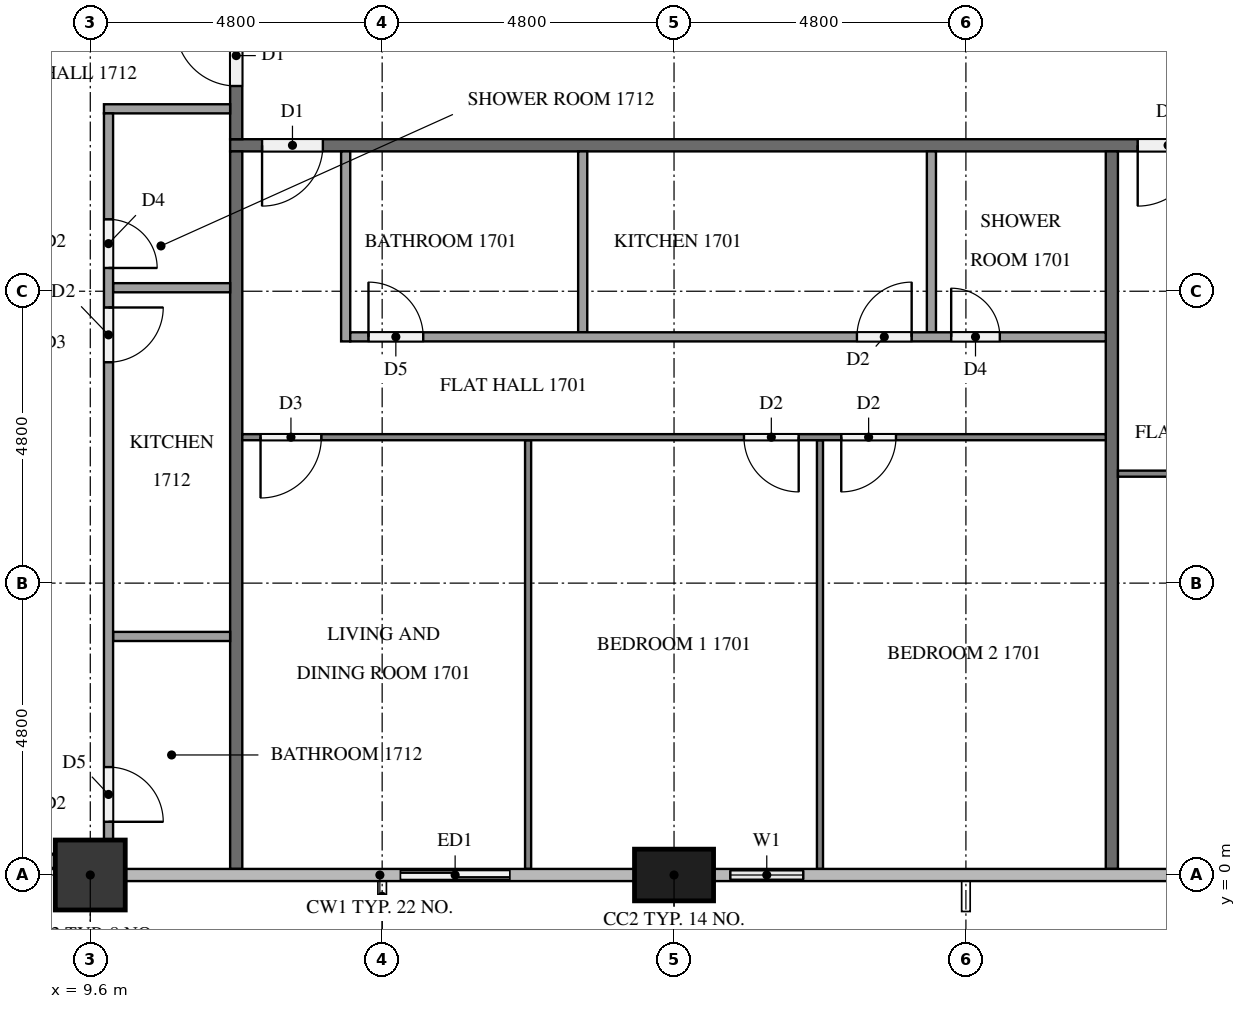
"""IFC4 building model, lengths in metres.
Left out: names, types, materials, properties, quantities, classifications, styles, units other than length and angle.
Written with IfcOpenShell. Run it as: python <this file> out.ifc"""

import sys

from ifc_helpers import new_model, si_unit, direction, frame, frame_2d, origin, origin_2d, place, context, subcontext, project, spatial, rectangle, extrude, element, fill, save


model = new_model("IFC4")
c1 = context("Model", 3, precision=1e-05, world=origin(), true_north=direction((0.0, 1.0)))
c2 = subcontext(c1, "Body", "Model", "MODEL_VIEW")
j1 = project(units=[si_unit("LENGTHUNIT", "METRE"), si_unit("PLANEANGLEUNIT", "RADIAN")], contexts=[c1])
p1 = place(None, origin())
s1 = spatial("IfcSite", under=j1, at=p1, CompositionType="ELEMENT")
p2 = place(p1, origin())
s2 = spatial("IfcBuilding", under=s1, at=p2, CompositionType="ELEMENT")
p3 = place(p2, frame((0.0, 0.0, 69.8)))
s3 = spatial("IfcBuildingStorey", under=s2, at=p3, CompositionType="ELEMENT", Elevation=69.8)
p4 = place(p3, frame((9.6, 0.0, 0.0), z_axis=(0.0, 0.0, 1.0), x_axis=(1.0, 0.0, 0.0)))
e1 = element("IfcColumn", 1, at=p4, inside=s3, PredefinedType="COLUMN", context=c2, shape_type="SweptSolid", body=[
    extrude(rectangle(XDim=1.15, YDim=1.15, at=origin_2d()), origin(), (0.0, 0.0, 1.0), 3.2),
])
p5 = place(p3, frame((19.2, 0.0, 0.0), z_axis=(0.0, 0.0, 1.0), x_axis=(1.0, 0.0, 0.0)))
e2 = element("IfcColumn", 2, at=p5, inside=s3, PredefinedType="COLUMN", context=c2, shape_type="SweptSolid", body=[
    extrude(rectangle(XDim=1.3, YDim=0.85, at=origin_2d()), origin(), (0.0, 0.0, 1.0), 3.2),
])
p6 = place(p3, frame((14.4, 0.0, 0.0), z_axis=(0.0, 0.0, 1.0), x_axis=(1.0, 0.0, 0.0)))
e3 = element("IfcWall", 3, at=p6, inside=s3, PredefinedType="SOLIDWALL", context=c2, shape_type="SweptSolid", body=[
    extrude(rectangle(XDim=2.4, YDim=0.15, at=frame_2d((1.2, 0.0))), origin(), (0.0, 0.0, 1.0), 3.2),
])
p7 = place(p6, frame((0.3, 0.0, 0.0)))
e4 = element("IfcOpeningElement", 4, at=p7, cuts=e3, PredefinedType="OPENING", context=c2, shape_type="SweptSolid", body=[
    extrude(rectangle(XDim=1.8, YDim=2.4, at=frame_2d((0.9, 1.2))), frame((0.0, 0.085, 0.0), z_axis=(0.0, -1.0, 0.0), x_axis=(1.0, 0.0, 0.0)), (0.0, 0.0, 1.0), 0.17),
])
p8 = place(p3, frame((19.85, 0.0, 0.0), z_axis=(0.0, 0.0, 1.0), x_axis=(1.0, 0.0, 0.0)))
e5 = element("IfcWall", 5, at=p8, inside=s3, PredefinedType="SOLIDWALL", context=c2, shape_type="SweptSolid", body=[
    extrude(rectangle(XDim=1.75, YDim=0.15, at=frame_2d((0.875, 0.0))), origin(), (0.0, 0.0, 1.0), 3.2),
])
p9 = place(p8, frame((0.275, 0.0, 0.9)))
e6 = element("IfcOpeningElement", 6, at=p9, cuts=e5, PredefinedType="OPENING", context=c2, shape_type="SweptSolid", body=[
    extrude(rectangle(XDim=1.2, YDim=1.4, at=frame_2d((0.6, 0.7))), frame((0.0, 0.085, 0.0), z_axis=(0.0, -1.0, 0.0), x_axis=(1.0, 0.0, 0.0)), (0.0, 0.0, 1.0), 0.17),
])
p10 = place(p3, frame((50.5, 12.0, 0.0), z_axis=(0.0, 0.0, 1.0), x_axis=(-1.0, 0.0, 0.0)))
e7 = element("IfcWall", 7, at=p10, inside=s3, PredefinedType="PARTITIONING", context=c2, shape_type="SweptSolid", body=[
    extrude(rectangle(XDim=38.6, YDim=0.2, at=frame_2d((19.3, 0.0))), origin(), (0.0, 0.0, 1.0), 3.2),
])
p11 = place(p10, frame((37.075, 0.0, 0.0)))
e8 = element("IfcOpeningElement", 8, at=p11, cuts=e7, PredefinedType="OPENING", context=c2, shape_type="SweptSolid", body=[
    extrude(rectangle(XDim=1.0, YDim=2.1, at=frame_2d((0.5, 1.05))), frame((0.0, 0.11, 0.0), z_axis=(0.0, -1.0, 0.0), x_axis=(1.0, 0.0, 0.0)), (0.0, 0.0, 1.0), 0.22),
])
p12 = place(p10, frame((22.675, 0.0, 0.0)))
e9 = element("IfcOpeningElement", 9, at=p12, cuts=e7, PredefinedType="OPENING", context=c2, shape_type="SweptSolid", body=[
    extrude(rectangle(XDim=1.0, YDim=2.1, at=frame_2d((0.5, 1.05))), frame((0.0, 0.11, 0.0), z_axis=(0.0, -1.0, 0.0), x_axis=(1.0, 0.0, 0.0)), (0.0, 0.0, 1.0), 0.22),
])
p13 = place(p10, frame((0.525, 0.0, 0.0)))
e10 = element("IfcOpeningElement", 10, at=p13, cuts=e7, PredefinedType="OPENING", context=c2, shape_type="SweptSolid", body=[
    extrude(rectangle(XDim=1.0, YDim=2.1, at=frame_2d((0.5, 1.05))), frame((0.0, 0.11, 0.0), z_axis=(0.0, -1.0, 0.0), x_axis=(1.0, 0.0, 0.0)), (0.0, 0.0, 1.0), 0.22),
])
p14 = place(p3, frame((12.0, 12.1, 0.0), z_axis=(0.0, 0.0, 1.0), x_axis=(0.0, 1.0, 0.0)))
e11 = element("IfcWall", 11, at=p14, inside=s3, PredefinedType="PARTITIONING", context=c2, shape_type="SweptSolid", body=[
    extrude(rectangle(XDim=28.6, YDim=0.2, at=frame_2d((14.3, 0.0))), origin(), (0.0, 0.0, 1.0), 3.2),
])
p15 = place(p14, frame((14.725, 0.0, 0.0)))
e12 = element("IfcOpeningElement", 12, at=p15, cuts=e11, PredefinedType="OPENING", context=c2, shape_type="SweptSolid", body=[
    extrude(rectangle(XDim=1.0, YDim=2.1, at=frame_2d((0.5, 1.05))), frame((0.0, 0.11, 0.0), z_axis=(0.0, -1.0, 0.0), x_axis=(1.0, 0.0, 0.0)), (0.0, 0.0, 1.0), 0.22),
])
p16 = place(p14, frame((12.875, 0.0, 0.0)))
e13 = element("IfcOpeningElement", 13, at=p16, cuts=e11, PredefinedType="OPENING", context=c2, shape_type="SweptSolid", body=[
    extrude(rectangle(XDim=1.0, YDim=2.1, at=frame_2d((0.5, 1.05))), frame((0.0, 0.11, 0.0), z_axis=(0.0, -1.0, 0.0), x_axis=(1.0, 0.0, 0.0)), (0.0, 0.0, 1.0), 0.22),
])
p17 = place(p14, frame((0.875, 0.0, 0.0)))
e14 = element("IfcOpeningElement", 14, at=p17, cuts=e11, PredefinedType="OPENING", context=c2, shape_type="SweptSolid", body=[
    extrude(rectangle(XDim=1.0, YDim=2.1, at=frame_2d((0.5, 1.05))), frame((0.0, 0.11, 0.0), z_axis=(0.0, -1.0, 0.0), x_axis=(1.0, 0.0, 0.0)), (0.0, 0.0, 1.0), 0.22),
])
for number, where, z_axis, x_axis in (
    (15, (26.4, 11.9, 0.0), (0.0, 0.0, 1.0), (0.0, -1.0, 0.0)),
    (16, (12.0, 0.1, 0.0), (0.0, 0.0, 1.0), (0.0, 1.0, 0.0)),
):
    element("IfcWall", number, at=place(p3, frame(where, z_axis=z_axis, x_axis=x_axis)), inside=s3, PredefinedType="PARTITIONING", context=c2, shape_type="SweptSolid", body=[
        extrude(rectangle(XDim=11.8, YDim=0.2, at=frame_2d((5.9, 0.0))), origin(), (0.0, 0.0, 1.0), 3.2),
    ])
for number, where, z_axis, x_axis in (
    (17, (16.8, 7.15, 0.0), (0.0, 0.0, 1.0), (0.0, -1.0, 0.0)),
    (18, (21.6, 7.15, 0.0), (0.0, 0.0, 1.0), (0.0, -1.0, 0.0)),
):
    element("IfcWall", number, at=place(p3, frame(where, z_axis=z_axis, x_axis=x_axis)), inside=s3, PredefinedType="PARTITIONING", context=c2, shape_type="SweptSolid", body=[
        extrude(rectangle(XDim=7.05, YDim=0.1, at=frame_2d((3.525, 0.0))), origin(), (0.0, 0.0, 1.0), 3.2),
    ])
p18 = place(p3, frame((26.3, 7.2, 0.0), z_axis=(0.0, 0.0, 1.0), x_axis=(-1.0, 0.0, 0.0)))
e19 = element("IfcWall", 19, at=p18, inside=s3, PredefinedType="PARTITIONING", context=c2, shape_type="SweptSolid", body=[
    extrude(rectangle(XDim=14.2, YDim=0.1, at=frame_2d((7.1, 0.0))), origin(), (0.0, 0.0, 1.0), 3.2),
])
p19 = place(p18, frame((12.9, 0.0, 0.0)))
e20 = element("IfcOpeningElement", 20, at=p19, cuts=e19, PredefinedType="OPENING", context=c2, shape_type="SweptSolid", body=[
    extrude(rectangle(XDim=1.0, YDim=2.1, at=frame_2d((0.5, 1.05))), frame((0.0, 0.06, 0.0), z_axis=(0.0, -1.0, 0.0), x_axis=(1.0, 0.0, 0.0)), (0.0, 0.0, 1.0), 0.12),
])
p20 = place(p18, frame((5.05, 0.0, 0.0)))
e21 = element("IfcOpeningElement", 21, at=p20, cuts=e19, PredefinedType="OPENING", context=c2, shape_type="SweptSolid", body=[
    extrude(rectangle(XDim=0.9, YDim=2.1, at=frame_2d((0.45, 1.05))), frame((0.0, 0.06, 0.0), z_axis=(0.0, -1.0, 0.0), x_axis=(1.0, 0.0, 0.0)), (0.0, 0.0, 1.0), 0.12),
])
p21 = place(p18, frame((3.45, 0.0, 0.0)))
e22 = element("IfcOpeningElement", 22, at=p21, cuts=e19, PredefinedType="OPENING", context=c2, shape_type="SweptSolid", body=[
    extrude(rectangle(XDim=0.9, YDim=2.1, at=frame_2d((0.45, 1.05))), frame((0.0, 0.06, 0.0), z_axis=(0.0, -1.0, 0.0), x_axis=(1.0, 0.0, 0.0)), (0.0, 0.0, 1.0), 0.12),
])
for number, where, z_axis, x_axis in (
    (23, (17.698, 11.9, 0.0), (0.0, 0.0, 1.0), (0.0, -1.0, 0.0)),
    (24, (23.433, 11.9, 0.0), (0.0, 0.0, 1.0), (0.0, -1.0, 0.0)),
):
    element("IfcWall", number, at=place(p3, frame(where, z_axis=z_axis, x_axis=x_axis)), inside=s3, PredefinedType="PARTITIONING", context=c2, shape_type="SweptSolid", body=[
        extrude(rectangle(XDim=2.975, YDim=0.15, at=frame_2d((1.487, 0.0))), origin(), (0.0, 0.0, 1.0), 3.2),
    ])
p22 = place(p3, frame((13.8, 11.9, 0.0), z_axis=(0.0, 0.0, 1.0), x_axis=(0.0, -1.0, 0.0)))
e25 = element("IfcWall", 25, at=p22, inside=s3, PredefinedType="PARTITIONING", context=c2, shape_type="SweptSolid", body=[
    extrude(rectangle(XDim=3.125, YDim=0.15, at=frame_2d((1.562, 0.0))), origin(), (0.0, 0.0, 1.0), 3.2),
])
p23 = place(p3, frame((13.875, 8.85, 0.0), z_axis=(0.0, 0.0, 1.0), x_axis=(1.0, 0.0, 0.0)))
e26 = element("IfcWall", 26, at=p23, inside=s3, PredefinedType="PARTITIONING", context=c2, shape_type="SweptSolid", body=[
    extrude(rectangle(XDim=12.425, YDim=0.15, at=frame_2d((6.212, 0.0))), origin(), (0.0, 0.0, 1.0), 3.2),
])
p24 = place(p23, frame((0.3, 0.0, 0.0)))
e27 = element("IfcOpeningElement", 27, at=p24, cuts=e26, PredefinedType="OPENING", context=c2, shape_type="SweptSolid", body=[
    extrude(rectangle(XDim=0.9, YDim=2.1, at=frame_2d((0.45, 1.05))), frame((0.0, 0.085, 0.0), z_axis=(0.0, -1.0, 0.0), x_axis=(1.0, 0.0, 0.0)), (0.0, 0.0, 1.0), 0.17),
])
p25 = place(p23, frame((8.333, 0.0, 0.0)))
e28 = element("IfcOpeningElement", 28, at=p25, cuts=e26, PredefinedType="OPENING", context=c2, shape_type="SweptSolid", body=[
    extrude(rectangle(XDim=0.9, YDim=2.1, at=frame_2d((0.45, 1.05))), frame((0.0, 0.085, 0.0), z_axis=(0.0, -1.0, 0.0), x_axis=(1.0, 0.0, 0.0)), (0.0, 0.0, 1.0), 0.17),
])
p26 = place(p23, frame((9.883, 0.0, 0.0)))
e29 = element("IfcOpeningElement", 29, at=p26, cuts=e26, PredefinedType="OPENING", context=c2, shape_type="SweptSolid", body=[
    extrude(rectangle(XDim=0.8, YDim=2.1, at=frame_2d((0.4, 1.05))), frame((0.0, 0.085, 0.0), z_axis=(0.0, -1.0, 0.0), x_axis=(1.0, 0.0, 0.0)), (0.0, 0.0, 1.0), 0.17),
])
p27 = place(p3, frame((38.3, 6.6, 0.0), z_axis=(0.0, 0.0, 1.0), x_axis=(-1.0, 0.0, 0.0)))
e30 = element("IfcWall", 30, at=p27, inside=s3, PredefinedType="PARTITIONING", context=c2, shape_type="SweptSolid", body=[
    extrude(rectangle(XDim=11.8, YDim=0.1, at=frame_2d((5.9, 0.0))), origin(), (0.0, 0.0, 1.0), 3.2),
])
p28 = place(p27, frame((5.05, 0.0, 0.0)))
e31 = element("IfcOpeningElement", 31, at=p28, cuts=e30, PredefinedType="OPENING", context=c2, shape_type="SweptSolid", body=[
    extrude(rectangle(XDim=1.0, YDim=2.1, at=frame_2d((0.5, 1.05))), frame((0.0, 0.06, 0.0), z_axis=(0.0, -1.0, 0.0), x_axis=(1.0, 0.0, 0.0)), (0.0, 0.0, 1.0), 0.12),
])
p29 = place(p27, frame((3.45, 0.0, 0.0)))
e32 = element("IfcOpeningElement", 32, at=p29, cuts=e30, PredefinedType="OPENING", context=c2, shape_type="SweptSolid", body=[
    extrude(rectangle(XDim=0.9, YDim=2.1, at=frame_2d((0.45, 1.05))), frame((0.0, 0.06, 0.0), z_axis=(0.0, -1.0, 0.0), x_axis=(1.0, 0.0, 0.0)), (0.0, 0.0, 1.0), 0.12),
])
for number, where, z_axis, x_axis in (
    (33, (11.9, 9.658, 0.0), (0.0, 0.0, 1.0), (-1.0, 0.0, 0.0)),
    (34, (11.9, 3.923, 0.0), (0.0, 0.0, 1.0), (-1.0, 0.0, 0.0)),
):
    element("IfcWall", number, at=place(p3, frame(where, z_axis=z_axis, x_axis=x_axis)), inside=s3, PredefinedType="PARTITIONING", context=c2, shape_type="SweptSolid", body=[
        extrude(rectangle(XDim=1.925, YDim=0.15, at=frame_2d((0.962, 0.0))), origin(), (0.0, 0.0, 1.0), 3.2),
    ])
p30 = place(p3, frame((11.9, 12.6, 0.0), z_axis=(0.0, 0.0, 1.0), x_axis=(-1.0, 0.0, 0.0)))
e35 = element("IfcWall", 35, at=p30, inside=s3, PredefinedType="PARTITIONING", context=c2, shape_type="SweptSolid", body=[
    extrude(rectangle(XDim=2.075, YDim=0.15, at=frame_2d((1.038, 0.0))), origin(), (0.0, 0.0, 1.0), 3.2),
])
p31 = place(p3, frame((9.9, 12.525, 0.0), z_axis=(0.0, 0.0, 1.0), x_axis=(0.0, -1.0, 0.0)))
e36 = element("IfcWall", 36, at=p31, inside=s3, PredefinedType="PARTITIONING", context=c2, shape_type="SweptSolid", body=[
    extrude(rectangle(XDim=11.95, YDim=0.15, at=frame_2d((5.975, 0.0))), origin(), (0.0, 0.0, 1.0), 3.2),
])
p32 = place(p31, frame((1.742, 0.0, 0.0)))
e37 = element("IfcOpeningElement", 37, at=p32, cuts=e36, PredefinedType="OPENING", context=c2, shape_type="SweptSolid", body=[
    extrude(rectangle(XDim=0.8, YDim=2.1, at=frame_2d((0.4, 1.05))), frame((0.0, 0.085, 0.0), z_axis=(0.0, -1.0, 0.0), x_axis=(1.0, 0.0, 0.0)), (0.0, 0.0, 1.0), 0.17),
])
p33 = place(p31, frame((3.192, 0.0, 0.0)))
e38 = element("IfcOpeningElement", 38, at=p33, cuts=e36, PredefinedType="OPENING", context=c2, shape_type="SweptSolid", body=[
    extrude(rectangle(XDim=0.9, YDim=2.1, at=frame_2d((0.45, 1.05))), frame((0.0, 0.085, 0.0), z_axis=(0.0, -1.0, 0.0), x_axis=(1.0, 0.0, 0.0)), (0.0, 0.0, 1.0), 0.17),
])
p34 = place(p31, frame((10.75, 0.0, 0.0)))
e39 = element("IfcOpeningElement", 39, at=p34, cuts=e36, PredefinedType="OPENING", context=c2, shape_type="SweptSolid", body=[
    extrude(rectangle(XDim=0.9, YDim=2.1, at=frame_2d((0.45, 1.05))), frame((0.0, 0.085, 0.0), z_axis=(0.0, -1.0, 0.0), x_axis=(1.0, 0.0, 0.0)), (0.0, 0.0, 1.0), 0.17),
])
p35 = place(p7, origin())
e40 = element("IfcDoor", 40, at=p35, inside=s3, OperationType="SLIDING_TO_LEFT", PredefinedType="DOOR", context=c2, shape_type="SweptSolid", body=[
    extrude(rectangle(XDim=1.8, YDim=2.4, at=frame_2d((0.9, 1.2))), frame((0.0, 0.025, 0.0), z_axis=(0.0, -1.0, 0.0), x_axis=(1.0, 0.0, 0.0)), (0.0, 0.0, 1.0), 0.05),
])
fill(e4, e40)
p36 = place(p9, origin())
e41 = element("IfcWindow", 41, at=p36, inside=s3, PartitioningType="SINGLE_PANEL", PredefinedType="WINDOW", context=c2, shape_type="SweptSolid", body=[
    extrude(rectangle(XDim=1.2, YDim=1.4, at=frame_2d((0.6, 0.7))), frame((0.0, 0.03, 0.0), z_axis=(0.0, -1.0, 0.0), x_axis=(1.0, 0.0, 0.0)), (0.0, 0.0, 1.0), 0.06),
])
fill(e6, e41)
p37 = place(p11, origin())
e42 = element("IfcDoor", 42, at=p37, inside=s3, OperationType="SINGLE_SWING_RIGHT", PredefinedType="DOOR", context=c2, shape_type="SweptSolid", body=[
    extrude(rectangle(XDim=1.0, YDim=2.1, at=frame_2d((0.5, 1.05))), frame((0.0, 0.025, 0.0), z_axis=(0.0, -1.0, 0.0), x_axis=(1.0, 0.0, 0.0)), (0.0, 0.0, 1.0), 0.05),
])
fill(e8, e42)
p38 = place(p12, origin())
e43 = element("IfcDoor", 43, at=p38, inside=s3, OperationType="SINGLE_SWING_RIGHT", PredefinedType="DOOR", context=c2, shape_type="SweptSolid", body=[
    extrude(rectangle(XDim=1.0, YDim=2.1, at=frame_2d((0.5, 1.05))), frame((0.0, 0.025, 0.0), z_axis=(0.0, -1.0, 0.0), x_axis=(1.0, 0.0, 0.0)), (0.0, 0.0, 1.0), 0.05),
])
fill(e9, e43)
p39 = place(p17, origin())
e44 = element("IfcDoor", 44, at=p39, inside=s3, OperationType="SINGLE_SWING_RIGHT", PredefinedType="DOOR", context=c2, shape_type="SweptSolid", body=[
    extrude(rectangle(XDim=1.0, YDim=2.1, at=frame_2d((0.5, 1.05))), frame((0.0, 0.025, 0.0), z_axis=(0.0, -1.0, 0.0), x_axis=(1.0, 0.0, 0.0)), (0.0, 0.0, 1.0), 0.05),
])
fill(e14, e44)
p40 = place(p19, origin())
e45 = element("IfcDoor", 45, at=p40, inside=s3, OperationType="SINGLE_SWING_RIGHT", PredefinedType="DOOR", context=c2, shape_type="SweptSolid", body=[
    extrude(rectangle(XDim=1.0, YDim=2.1, at=frame_2d((0.5, 1.05))), frame((0.0, 0.025, 0.0), z_axis=(0.0, -1.0, 0.0), x_axis=(1.0, 0.0, 0.0)), (0.0, 0.0, 1.0), 0.05),
])
fill(e20, e45)
p41 = place(p20, origin())
e46 = element("IfcDoor", 46, at=p41, inside=s3, OperationType="SINGLE_SWING_LEFT", PredefinedType="DOOR", context=c2, shape_type="SweptSolid", body=[
    extrude(rectangle(XDim=0.9, YDim=2.1, at=frame_2d((0.45, 1.05))), frame((0.0, 0.025, 0.0), z_axis=(0.0, -1.0, 0.0), x_axis=(1.0, 0.0, 0.0)), (0.0, 0.0, 1.0), 0.05),
])
fill(e21, e46)
p42 = place(p21, origin())
e47 = element("IfcDoor", 47, at=p42, inside=s3, OperationType="SINGLE_SWING_RIGHT", PredefinedType="DOOR", context=c2, shape_type="SweptSolid", body=[
    extrude(rectangle(XDim=0.9, YDim=2.1, at=frame_2d((0.45, 1.05))), frame((0.0, 0.025, 0.0), z_axis=(0.0, -1.0, 0.0), x_axis=(1.0, 0.0, 0.0)), (0.0, 0.0, 1.0), 0.05),
])
fill(e22, e47)
p43 = place(p24, origin())
e48 = element("IfcDoor", 48, at=p43, inside=s3, OperationType="SINGLE_SWING_LEFT", PredefinedType="DOOR", context=c2, shape_type="SweptSolid", body=[
    extrude(rectangle(XDim=0.9, YDim=2.1, at=frame_2d((0.45, 1.05))), frame((0.0, 0.025, 0.0), z_axis=(0.0, -1.0, 0.0), x_axis=(1.0, 0.0, 0.0)), (0.0, 0.0, 1.0), 0.05),
])
fill(e27, e48)
p44 = place(p25, origin())
e49 = element("IfcDoor", 49, at=p44, inside=s3, OperationType="SINGLE_SWING_RIGHT", PredefinedType="DOOR", context=c2, shape_type="SweptSolid", body=[
    extrude(rectangle(XDim=0.9, YDim=2.1, at=frame_2d((0.45, 1.05))), frame((0.0, 0.025, 0.0), z_axis=(0.0, -1.0, 0.0), x_axis=(1.0, 0.0, 0.0)), (0.0, 0.0, 1.0), 0.05),
])
fill(e28, e49)
p45 = place(p26, origin())
e50 = element("IfcDoor", 50, at=p45, inside=s3, OperationType="SINGLE_SWING_LEFT", PredefinedType="DOOR", context=c2, shape_type="SweptSolid", body=[
    extrude(rectangle(XDim=0.8, YDim=2.1, at=frame_2d((0.4, 1.05))), frame((0.0, 0.025, 0.0), z_axis=(0.0, -1.0, 0.0), x_axis=(1.0, 0.0, 0.0)), (0.0, 0.0, 1.0), 0.05),
])
fill(e29, e50)
p46 = place(p32, origin())
e51 = element("IfcDoor", 51, at=p46, inside=s3, OperationType="SINGLE_SWING_RIGHT", PredefinedType="DOOR", context=c2, shape_type="SweptSolid", body=[
    extrude(rectangle(XDim=0.8, YDim=2.1, at=frame_2d((0.4, 1.05))), frame((0.0, 0.025, 0.0), z_axis=(0.0, -1.0, 0.0), x_axis=(1.0, 0.0, 0.0)), (0.0, 0.0, 1.0), 0.05),
])
fill(e37, e51)
p47 = place(p33, origin())
e52 = element("IfcDoor", 52, at=p47, inside=s3, OperationType="SINGLE_SWING_LEFT", PredefinedType="DOOR", context=c2, shape_type="SweptSolid", body=[
    extrude(rectangle(XDim=0.9, YDim=2.1, at=frame_2d((0.45, 1.05))), frame((0.0, 0.025, 0.0), z_axis=(0.0, -1.0, 0.0), x_axis=(1.0, 0.0, 0.0)), (0.0, 0.0, 1.0), 0.05),
])
fill(e38, e52)
p48 = place(p34, origin())
e53 = element("IfcDoor", 53, at=p48, inside=s3, OperationType="SINGLE_SWING_RIGHT", PredefinedType="DOOR", context=c2, shape_type="SweptSolid", body=[
    extrude(rectangle(XDim=0.9, YDim=2.1, at=frame_2d((0.45, 1.05))), frame((0.0, 0.025, 0.0), z_axis=(0.0, -1.0, 0.0), x_axis=(1.0, 0.0, 0.0)), (0.0, 0.0, 1.0), 0.05),
])
fill(e39, e53)
save(model, sys.argv[1])
